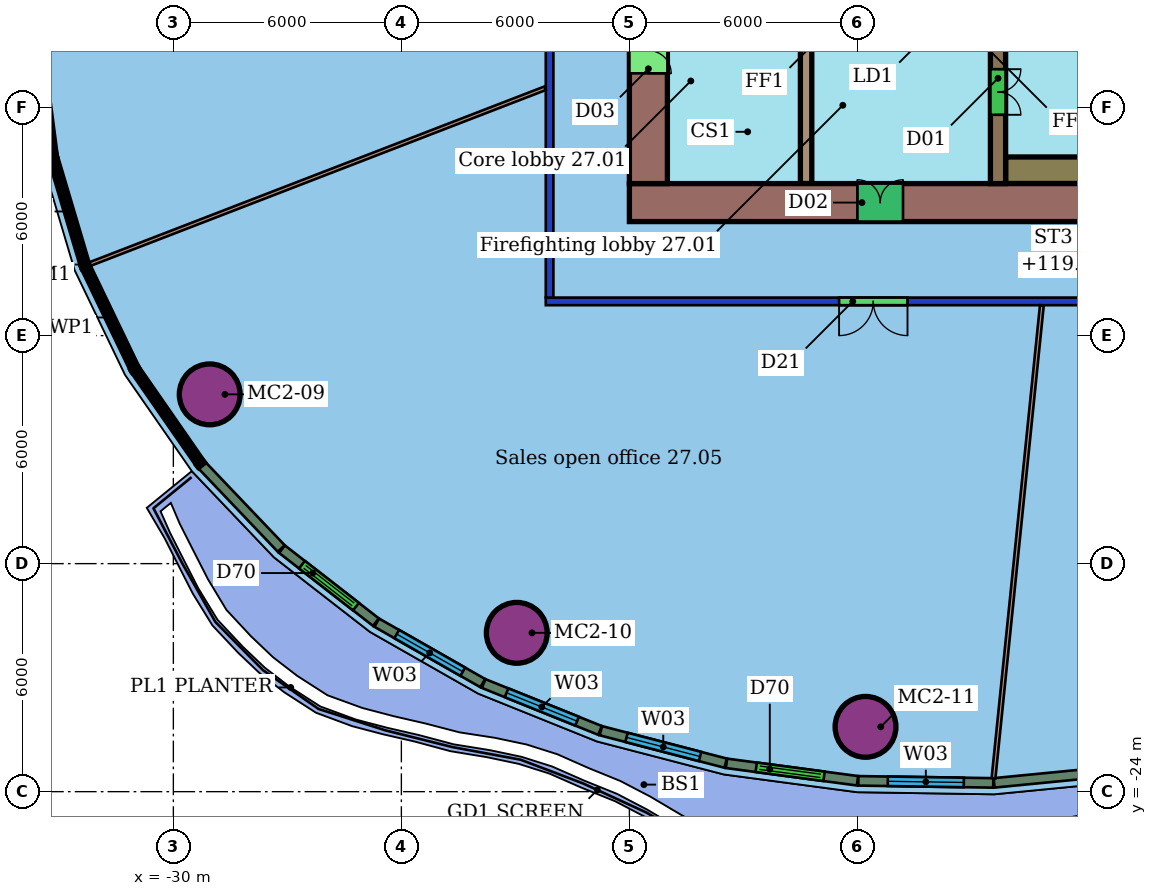
"""IFC4 building model, lengths in metres.
Left out: names, types, materials, properties, quantities, classifications, styles, units other than length and angle.
Written with IfcOpenShell. Run it as: python <this file> out.ifc"""

import sys

from ifc_helpers import new_model, si_unit, direction, frame, frame_2d, origin, origin_2d, place, context, subcontext, project, spatial, rectangle, hollow_circle, extrude, element, fill, save


model = new_model("IFC4")
c1 = context("Model", 3, precision=1e-05, world=origin(), true_north=direction((0.0, 1.0)))
c2 = subcontext(c1, "Body", "Model", "MODEL_VIEW")
j1 = project(units=[si_unit("LENGTHUNIT", "METRE"), si_unit("PLANEANGLEUNIT", "RADIAN")], contexts=[c1])
p1 = place(None, origin())
s1 = spatial("IfcSite", under=j1, at=p1, CompositionType="ELEMENT")
p2 = place(p1, origin())
s2 = spatial("IfcBuilding", under=s1, at=p2, CompositionType="ELEMENT")
p3 = place(p2, frame((0.0, 0.0, 117.4)))
s3 = spatial("IfcBuildingStorey", under=s2, at=p3, CompositionType="ELEMENT", Elevation=117.4)
for number, where, z_axis, x_axis in (
    (1, (-29.043, -13.547, 0.0), (0.0, 0.0, 1.0), (1.0, 0.0, 0.0)),
    (2, (-20.963, -19.821, 0.0), (0.0, 0.0, 1.0), (1.0, 0.0, 0.0)),
    (3, (-11.787, -22.294, 0.0), (0.0, 0.0, 1.0), (1.0, 0.0, 0.0)),
):
    element("IfcColumn", number, at=place(p3, frame(where, z_axis=z_axis, x_axis=x_axis)), inside=s3, PredefinedType="COLUMN", context=c2, shape_type="SweptSolid", body=[
        extrude(hollow_circle(Radius=0.8, WallThickness=0.055, at=origin_2d()), origin(), (0.0, 0.0, 1.0), 3.45),
    ])
p4 = place(p3, frame((8.2, -11.1, 0.0), z_axis=(0.0, 0.0, 1.0), x_axis=(-1.0, 0.0, 0.0)))
e4 = element("IfcWall", 4, at=p4, inside=s3, PredefinedType="PARTITIONING", context=c2, shape_type="SweptSolid", body=[
    extrude(rectangle(XDim=28.4, YDim=0.2, at=frame_2d((14.2, 0.0))), origin(), (0.0, 0.0, 1.0), 3.0),
])
p5 = place(p4, frame((18.882, 0.0, 0.0)))
e5 = element("IfcOpeningElement", 5, at=p5, cuts=e4, PredefinedType="OPENING", context=c2, shape_type="SweptSolid", body=[
    extrude(rectangle(XDim=1.8, YDim=2.1, at=frame_2d((0.9, 1.05))), frame((0.0, 0.11, 0.0), z_axis=(0.0, -1.0, 0.0), x_axis=(1.0, 0.0, 0.0)), (0.0, 0.0, 1.0), 0.22),
])
p6 = place(p4, frame((9.322, 0.0, 0.0)))
e6 = element("IfcOpeningElement", 6, at=p6, cuts=e4, PredefinedType="OPENING", context=c2, shape_type="SweptSolid", body=[
    extrude(rectangle(XDim=1.8, YDim=2.1, at=frame_2d((0.9, 1.05))), frame((0.0, 0.11, 0.0), z_axis=(0.0, -1.0, 0.0), x_axis=(1.0, 0.0, 0.0)), (0.0, 0.0, 1.0), 0.22),
])
p7 = place(p3, frame((-20.1, -11.0, 0.0), z_axis=(0.0, 0.0, 1.0), x_axis=(0.0, 1.0, 0.0)))
e7 = element("IfcWall", 7, at=p7, inside=s3, PredefinedType="PARTITIONING", context=c2, shape_type="SweptSolid", body=[
    extrude(rectangle(XDim=22.0, YDim=0.2, at=frame_2d((11.0, 0.0))), origin(), (0.0, 0.0, 1.0), 3.0),
])
p8 = place(p7, frame((8.824, 0.0, 0.0)))
e8 = element("IfcOpeningElement", 8, at=p8, cuts=e7, PredefinedType="OPENING", context=c2, shape_type="SweptSolid", body=[
    extrude(rectangle(XDim=1.8, YDim=2.1, at=frame_2d((0.9, 1.05))), frame((0.0, 0.11, 0.0), z_axis=(0.0, -1.0, 0.0), x_axis=(1.0, 0.0, 0.0)), (0.0, 0.0, 1.0), 0.22),
])
p9 = place(p3, frame((-32.203, -10.122, 0.0), z_axis=(0.0, 0.0, 1.0), x_axis=(0.932826006306, 0.360327131866, 0.0)))
e9 = element("IfcWall", 9, at=p9, inside=s3, PredefinedType="PARTITIONING", context=c2, shape_type="SweptSolid", body=[
    extrude(rectangle(XDim=12.848, YDim=0.1, at=frame_2d((6.424, 0.0))), origin(), (0.0, 0.0, 1.0), 3.45),
])
p10 = place(p3, frame((-8.418, -23.645, 0.0), z_axis=(0.0, 0.0, 1.0), x_axis=(0.101738063261, 0.994811221531, 0.0)))
e10 = element("IfcWall", 10, at=p10, inside=s3, PredefinedType="PARTITIONING", context=c2, shape_type="SweptSolid", body=[
    extrude(rectangle(XDim=12.505, YDim=0.1, at=frame_2d((6.252, 0.0))), origin(), (0.0, 0.0, 1.0), 3.45),
])
p11 = place(p3, frame((-29.244, -15.416, 0.0), z_axis=(0.0, 0.0, 1.0), x_axis=(0.689879279413, -0.723924429645, 0.0)))
e11 = element("IfcWall", 11, at=p11, inside=s3, PredefinedType="SOLIDWALL", context=c2, shape_type="SweptSolid", body=[
    extrude(rectangle(XDim=3.019, YDim=0.25, at=frame_2d((1.51, 0.0))), origin(), (0.0, 0.0, 1.0), 3.05),
])
p12 = place(p3, frame((-27.141, -17.619, 0.0), z_axis=(0.0, 0.0, 1.0), x_axis=(0.789746930571, -0.613432788213, 0.0)))
e12 = element("IfcWall", 12, at=p12, inside=s3, PredefinedType="SOLIDWALL", context=c2, shape_type="SweptSolid", body=[
    extrude(rectangle(XDim=3.129, YDim=0.25, at=frame_2d((1.565, 0.0))), origin(), (0.0, 0.0, 1.0), 3.05),
])
p13 = place(p12, frame((0.665, 0.0, 0.0)))
e13 = element("IfcOpeningElement", 13, at=p13, cuts=e12, PredefinedType="OPENING", context=c2, shape_type="SweptSolid", body=[
    extrude(rectangle(XDim=1.8, YDim=2.4, at=frame_2d((0.9, 1.2))), frame((0.0, 0.135, 0.0), z_axis=(0.0, -1.0, 0.0), x_axis=(1.0, 0.0, 0.0)), (0.0, 0.0, 1.0), 0.27),
])
p14 = place(p3, frame((-24.648, -19.553, 0.0), z_axis=(0.0, 0.0, 1.0), x_axis=(0.868747839234, -0.495254673705, 0.0)))
e14 = element("IfcWall", 14, at=p14, inside=s3, PredefinedType="SOLIDWALL", context=c2, shape_type="SweptSolid", body=[
    extrude(rectangle(XDim=3.212, YDim=0.25, at=frame_2d((1.606, 0.0))), origin(), (0.0, 0.0, 1.0), 3.05),
])
p15 = place(p14, frame((0.606, 0.0, 0.9)))
e15 = element("IfcOpeningElement", 15, at=p15, cuts=e14, PredefinedType="OPENING", context=c2, shape_type="SweptSolid", body=[
    extrude(rectangle(XDim=2.0, YDim=2.1, at=frame_2d((1.0, 1.05))), frame((0.0, 0.135, 0.0), z_axis=(0.0, -1.0, 0.0), x_axis=(1.0, 0.0, 0.0)), (0.0, 0.0, 1.0), 0.27),
])
p16 = place(p3, frame((-21.835, -21.155, 0.0), z_axis=(0.0, 0.0, 1.0), x_axis=(0.927581627116, -0.373620562919, 0.0)))
e16 = element("IfcWall", 16, at=p16, inside=s3, PredefinedType="SOLIDWALL", context=c2, shape_type="SweptSolid", body=[
    extrude(rectangle(XDim=3.302, YDim=0.25, at=frame_2d((1.651, 0.0))), origin(), (0.0, 0.0, 1.0), 3.05),
])
p17 = place(p16, frame((0.651, 0.0, 0.9)))
e17 = element("IfcOpeningElement", 17, at=p17, cuts=e16, PredefinedType="OPENING", context=c2, shape_type="SweptSolid", body=[
    extrude(rectangle(XDim=2.0, YDim=2.1, at=frame_2d((1.0, 1.05))), frame((0.0, 0.135, 0.0), z_axis=(0.0, -1.0, 0.0), x_axis=(1.0, 0.0, 0.0)), (0.0, 0.0, 1.0), 0.27),
])
p18 = place(p3, frame((-18.75, -22.396, 0.0), z_axis=(0.0, 0.0, 1.0), x_axis=(0.967791300319, -0.251753846101, 0.0)))
e18 = element("IfcWall", 18, at=p18, inside=s3, PredefinedType="SOLIDWALL", context=c2, shape_type="SweptSolid", body=[
    extrude(rectangle(XDim=3.392, YDim=0.25, at=frame_2d((1.696, 0.0))), origin(), (0.0, 0.0, 1.0), 3.05),
])
p19 = place(p18, frame((0.696, 0.0, 0.9)))
e19 = element("IfcOpeningElement", 19, at=p19, cuts=e18, PredefinedType="OPENING", context=c2, shape_type="SweptSolid", body=[
    extrude(rectangle(XDim=2.0, YDim=2.1, at=frame_2d((1.0, 1.05))), frame((0.0, 0.135, 0.0), z_axis=(0.0, -1.0, 0.0), x_axis=(1.0, 0.0, 0.0)), (0.0, 0.0, 1.0), 0.27),
])
p20 = place(p3, frame((-15.444, -23.255, 0.0), z_axis=(0.0, 0.0, 1.0), x_axis=(0.991259146592, -0.131929163936, 0.0)))
e20 = element("IfcWall", 20, at=p20, inside=s3, PredefinedType="SOLIDWALL", context=c2, shape_type="SweptSolid", body=[
    extrude(rectangle(XDim=3.477, YDim=0.25, at=frame_2d((1.739, 0.0))), origin(), (0.0, 0.0, 1.0), 3.05),
])
p21 = place(p20, frame((0.789, 0.0, 0.0)))
e21 = element("IfcOpeningElement", 21, at=p21, cuts=e20, PredefinedType="OPENING", context=c2, shape_type="SweptSolid", body=[
    extrude(rectangle(XDim=1.8, YDim=2.4, at=frame_2d((0.9, 1.2))), frame((0.0, 0.135, 0.0), z_axis=(0.0, -1.0, 0.0), x_axis=(1.0, 0.0, 0.0)), (0.0, 0.0, 1.0), 0.27),
])
p22 = place(p3, frame((-11.975, -23.715, 0.0), z_axis=(0.0, 0.0, 1.0), x_axis=(0.999881433679, -0.015398655287, 0.0)))
e22 = element("IfcWall", 22, at=p22, inside=s3, PredefinedType="SOLIDWALL", context=c2, shape_type="SweptSolid", body=[
    extrude(rectangle(XDim=3.552, YDim=0.25, at=frame_2d((1.776, 0.0))), origin(), (0.0, 0.0, 1.0), 3.05),
])
p23 = place(p22, frame((0.776, 0.0, 0.9)))
e23 = element("IfcOpeningElement", 23, at=p23, cuts=e22, PredefinedType="OPENING", context=c2, shape_type="SweptSolid", body=[
    extrude(rectangle(XDim=2.0, YDim=2.1, at=frame_2d((1.0, 1.05))), frame((0.0, 0.135, 0.0), z_axis=(0.0, -1.0, 0.0), x_axis=(1.0, 0.0, 0.0)), (0.0, 0.0, 1.0), 0.27),
])
p24 = place(p3, frame((-8.402, -23.769, 0.0), z_axis=(0.0, 0.0, 1.0), x_axis=(0.995271567876, 0.097131386163, 0.0)))
e24 = element("IfcWall", 24, at=p24, inside=s3, PredefinedType="SOLIDWALL", context=c2, shape_type="SweptSolid", body=[
    extrude(rectangle(XDim=3.567, YDim=0.25, at=frame_2d((1.783, 0.0))), origin(), (0.0, 0.0, 1.0), 3.05),
])
p25 = place(p3, frame((-18.0, -8.5, 0.0), z_axis=(0.0, 0.0, 1.0), x_axis=(1.0, 0.0, 0.0)))
e25 = element("IfcWall", 25, at=p25, inside=s3, PredefinedType="SHEAR", context=c2, shape_type="SweptSolid", body=[
    extrude(rectangle(XDim=24.0, YDim=1.0, at=frame_2d((12.0, 0.0))), origin(), (0.0, 0.0, 1.0), 3.3),
])
p26 = place(p25, frame((6.0, 0.0, 0.0)))
e26 = element("IfcOpeningElement", 26, at=p26, cuts=e25, PredefinedType="OPENING", context=c2, shape_type="SweptSolid", body=[
    extrude(rectangle(XDim=1.2, YDim=2.1, at=frame_2d((0.6, 1.05))), frame((0.0, 0.51, 0.0), z_axis=(0.0, -1.0, 0.0), x_axis=(1.0, 0.0, 0.0)), (0.0, 0.0, 1.0), 1.02),
])
p27 = place(p3, frame((-17.5, 8.0, 0.0), z_axis=(0.0, 0.0, 1.0), x_axis=(0.0, -1.0, 0.0)))
e27 = element("IfcWall", 27, at=p27, inside=s3, PredefinedType="SHEAR", context=c2, shape_type="SweptSolid", body=[
    extrude(rectangle(XDim=16.0, YDim=1.0, at=frame_2d((8.0, 0.0))), origin(), (0.0, 0.0, 1.0), 3.3),
])
p28 = place(p27, frame((11.9, 0.0, 0.0)))
e28 = element("IfcOpeningElement", 28, at=p28, cuts=e27, PredefinedType="OPENING", context=c2, shape_type="SweptSolid", body=[
    extrude(rectangle(XDim=1.2, YDim=2.1, at=frame_2d((0.6, 1.05))), frame((0.0, 0.51, 0.0), z_axis=(0.0, -1.0, 0.0), x_axis=(1.0, 0.0, 0.0)), (0.0, 0.0, 1.0), 1.02),
])
p29 = place(p27, frame((2.9, 0.0, 0.0)))
e29 = element("IfcOpeningElement", 29, at=p29, cuts=e27, PredefinedType="OPENING", context=c2, shape_type="SweptSolid", body=[
    extrude(rectangle(XDim=1.2, YDim=2.1, at=frame_2d((0.6, 1.05))), frame((0.0, 0.51, 0.0), z_axis=(0.0, -1.0, 0.0), x_axis=(1.0, 0.0, 0.0)), (0.0, 0.0, 1.0), 1.02),
])
p30 = place(p3, frame((-13.35, 8.0, 0.0), z_axis=(0.0, 0.0, 1.0), x_axis=(0.0, -1.0, 0.0)))
e30 = element("IfcWall", 30, at=p30, inside=s3, PredefinedType="SHEAR", context=c2, shape_type="SweptSolid", body=[
    extrude(rectangle(XDim=16.0, YDim=0.3, at=frame_2d((8.0, 0.0))), origin(), (0.0, 0.0, 1.0), 3.3),
])
p31 = place(p30, frame((7.25, 0.0, 0.0)))
e31 = element("IfcOpeningElement", 31, at=p31, cuts=e30, PredefinedType="OPENING", context=c2, shape_type="SweptSolid", body=[
    extrude(rectangle(XDim=1.5, YDim=2.1, at=frame_2d((0.75, 1.05))), frame((0.0, 0.16, 0.0), z_axis=(0.0, -1.0, 0.0), x_axis=(1.0, 0.0, 0.0)), (0.0, 0.0, 1.0), 0.32),
])
p32 = place(p3, frame((-8.3, -3.88, 0.0), z_axis=(0.0, 0.0, 1.0), x_axis=(0.0, -1.0, 0.0)))
e32 = element("IfcWall", 32, at=p32, inside=s3, PredefinedType="SHEAR", context=c2, shape_type="SweptSolid", body=[
    extrude(rectangle(XDim=4.12, YDim=0.4, at=frame_2d((2.06, 0.0))), origin(), (0.0, 0.0, 1.0), 3.3),
])
p33 = place(p32, frame((1.11, 0.0, 0.0)))
e33 = element("IfcOpeningElement", 33, at=p33, cuts=e32, PredefinedType="OPENING", context=c2, shape_type="SweptSolid", body=[
    extrude(rectangle(XDim=1.2, YDim=2.1, at=frame_2d((0.6, 1.05))), frame((0.0, 0.21, 0.0), z_axis=(0.0, -1.0, 0.0), x_axis=(1.0, 0.0, 0.0)), (0.0, 0.0, 1.0), 0.42),
])
p34 = place(p3, frame((-8.1, -7.65, 0.0), z_axis=(0.0, 0.0, 1.0), x_axis=(1.0, 0.0, 0.0)))
e34 = element("IfcWall", 34, at=p34, inside=s3, PredefinedType="SHEAR", context=c2, shape_type="SweptSolid", body=[
    extrude(rectangle(XDim=7.05, YDim=0.7, at=frame_2d((3.525, 0.0))), origin(), (0.0, 0.0, 1.0), 3.3),
])
p35 = place(p5, origin())
e35 = element("IfcDoor", 35, at=p35, inside=s3, OperationType="DOUBLE_DOOR_SINGLE_SWING", PredefinedType="DOOR", context=c2, shape_type="SweptSolid", body=[
    extrude(rectangle(XDim=1.8, YDim=2.1, at=frame_2d((0.9, 1.05))), frame((0.0, 0.025, 0.0), z_axis=(0.0, -1.0, 0.0), x_axis=(1.0, 0.0, 0.0)), (0.0, 0.0, 1.0), 0.05),
])
fill(e5, e35)
p36 = place(p13, origin())
e36 = element("IfcDoor", 36, at=p36, inside=s3, OperationType="DOUBLE_DOOR_SLIDING", PredefinedType="DOOR", context=c2, shape_type="SweptSolid", body=[
    extrude(rectangle(XDim=1.8, YDim=2.4, at=frame_2d((0.9, 1.2))), frame((0.0, 0.025, 0.0), z_axis=(0.0, -1.0, 0.0), x_axis=(1.0, 0.0, 0.0)), (0.0, 0.0, 1.0), 0.05),
])
fill(e13, e36)
p37 = place(p15, origin())
e37 = element("IfcWindow", 37, at=p37, inside=s3, PartitioningType="SINGLE_PANEL", PredefinedType="WINDOW", context=c2, shape_type="SweptSolid", body=[
    extrude(rectangle(XDim=2.0, YDim=2.1, at=frame_2d((1.0, 1.05))), frame((0.0, 0.03, 0.0), z_axis=(0.0, -1.0, 0.0), x_axis=(1.0, 0.0, 0.0)), (0.0, 0.0, 1.0), 0.06),
])
fill(e15, e37)
p38 = place(p17, origin())
e38 = element("IfcWindow", 38, at=p38, inside=s3, PartitioningType="SINGLE_PANEL", PredefinedType="WINDOW", context=c2, shape_type="SweptSolid", body=[
    extrude(rectangle(XDim=2.0, YDim=2.1, at=frame_2d((1.0, 1.05))), frame((0.0, 0.03, 0.0), z_axis=(0.0, -1.0, 0.0), x_axis=(1.0, 0.0, 0.0)), (0.0, 0.0, 1.0), 0.06),
])
fill(e17, e38)
p39 = place(p19, origin())
e39 = element("IfcWindow", 39, at=p39, inside=s3, PartitioningType="SINGLE_PANEL", PredefinedType="WINDOW", context=c2, shape_type="SweptSolid", body=[
    extrude(rectangle(XDim=2.0, YDim=2.1, at=frame_2d((1.0, 1.05))), frame((0.0, 0.03, 0.0), z_axis=(0.0, -1.0, 0.0), x_axis=(1.0, 0.0, 0.0)), (0.0, 0.0, 1.0), 0.06),
])
fill(e19, e39)
p40 = place(p21, origin())
e40 = element("IfcDoor", 40, at=p40, inside=s3, OperationType="DOUBLE_DOOR_SLIDING", PredefinedType="DOOR", context=c2, shape_type="SweptSolid", body=[
    extrude(rectangle(XDim=1.8, YDim=2.4, at=frame_2d((0.9, 1.2))), frame((0.0, 0.025, 0.0), z_axis=(0.0, -1.0, 0.0), x_axis=(1.0, 0.0, 0.0)), (0.0, 0.0, 1.0), 0.05),
])
fill(e21, e40)
p41 = place(p23, origin())
e41 = element("IfcWindow", 41, at=p41, inside=s3, PartitioningType="SINGLE_PANEL", PredefinedType="WINDOW", context=c2, shape_type="SweptSolid", body=[
    extrude(rectangle(XDim=2.0, YDim=2.1, at=frame_2d((1.0, 1.05))), frame((0.0, 0.03, 0.0), z_axis=(0.0, -1.0, 0.0), x_axis=(1.0, 0.0, 0.0)), (0.0, 0.0, 1.0), 0.06),
])
fill(e23, e41)
p42 = place(p26, origin())
e42 = element("IfcDoor", 42, at=p42, inside=s3, OperationType="DOUBLE_DOOR_SINGLE_SWING", PredefinedType="NOTDEFINED", context=c2, shape_type="SweptSolid", body=[
    extrude(rectangle(XDim=1.2, YDim=2.1, at=frame_2d((0.6, 1.05))), frame((0.0, 0.025, 0.0), z_axis=(0.0, -1.0, 0.0), x_axis=(1.0, 0.0, 0.0)), (0.0, 0.0, 1.0), 0.05),
])
fill(e26, e42)
p43 = place(p28, origin())
e43 = element("IfcDoor", 43, at=p43, inside=s3, OperationType="DOUBLE_DOOR_SINGLE_SWING", PredefinedType="NOTDEFINED", context=c2, shape_type="SweptSolid", body=[
    extrude(rectangle(XDim=1.2, YDim=2.1, at=frame_2d((0.6, 1.05))), frame((0.0, 0.025, 0.0), z_axis=(0.0, -1.0, 0.0), x_axis=(1.0, 0.0, 0.0)), (0.0, 0.0, 1.0), 0.05),
])
fill(e28, e43)
p44 = place(p33, origin())
e44 = element("IfcDoor", 44, at=p44, inside=s3, OperationType="DOUBLE_DOOR_SINGLE_SWING", PredefinedType="NOTDEFINED", context=c2, shape_type="SweptSolid", body=[
    extrude(rectangle(XDim=1.2, YDim=2.1, at=frame_2d((0.6, 1.05))), frame((0.0, 0.025, 0.0), z_axis=(0.0, -1.0, 0.0), x_axis=(1.0, 0.0, 0.0)), (0.0, 0.0, 1.0), 0.05),
])
fill(e33, e44)
save(model, sys.argv[1])
